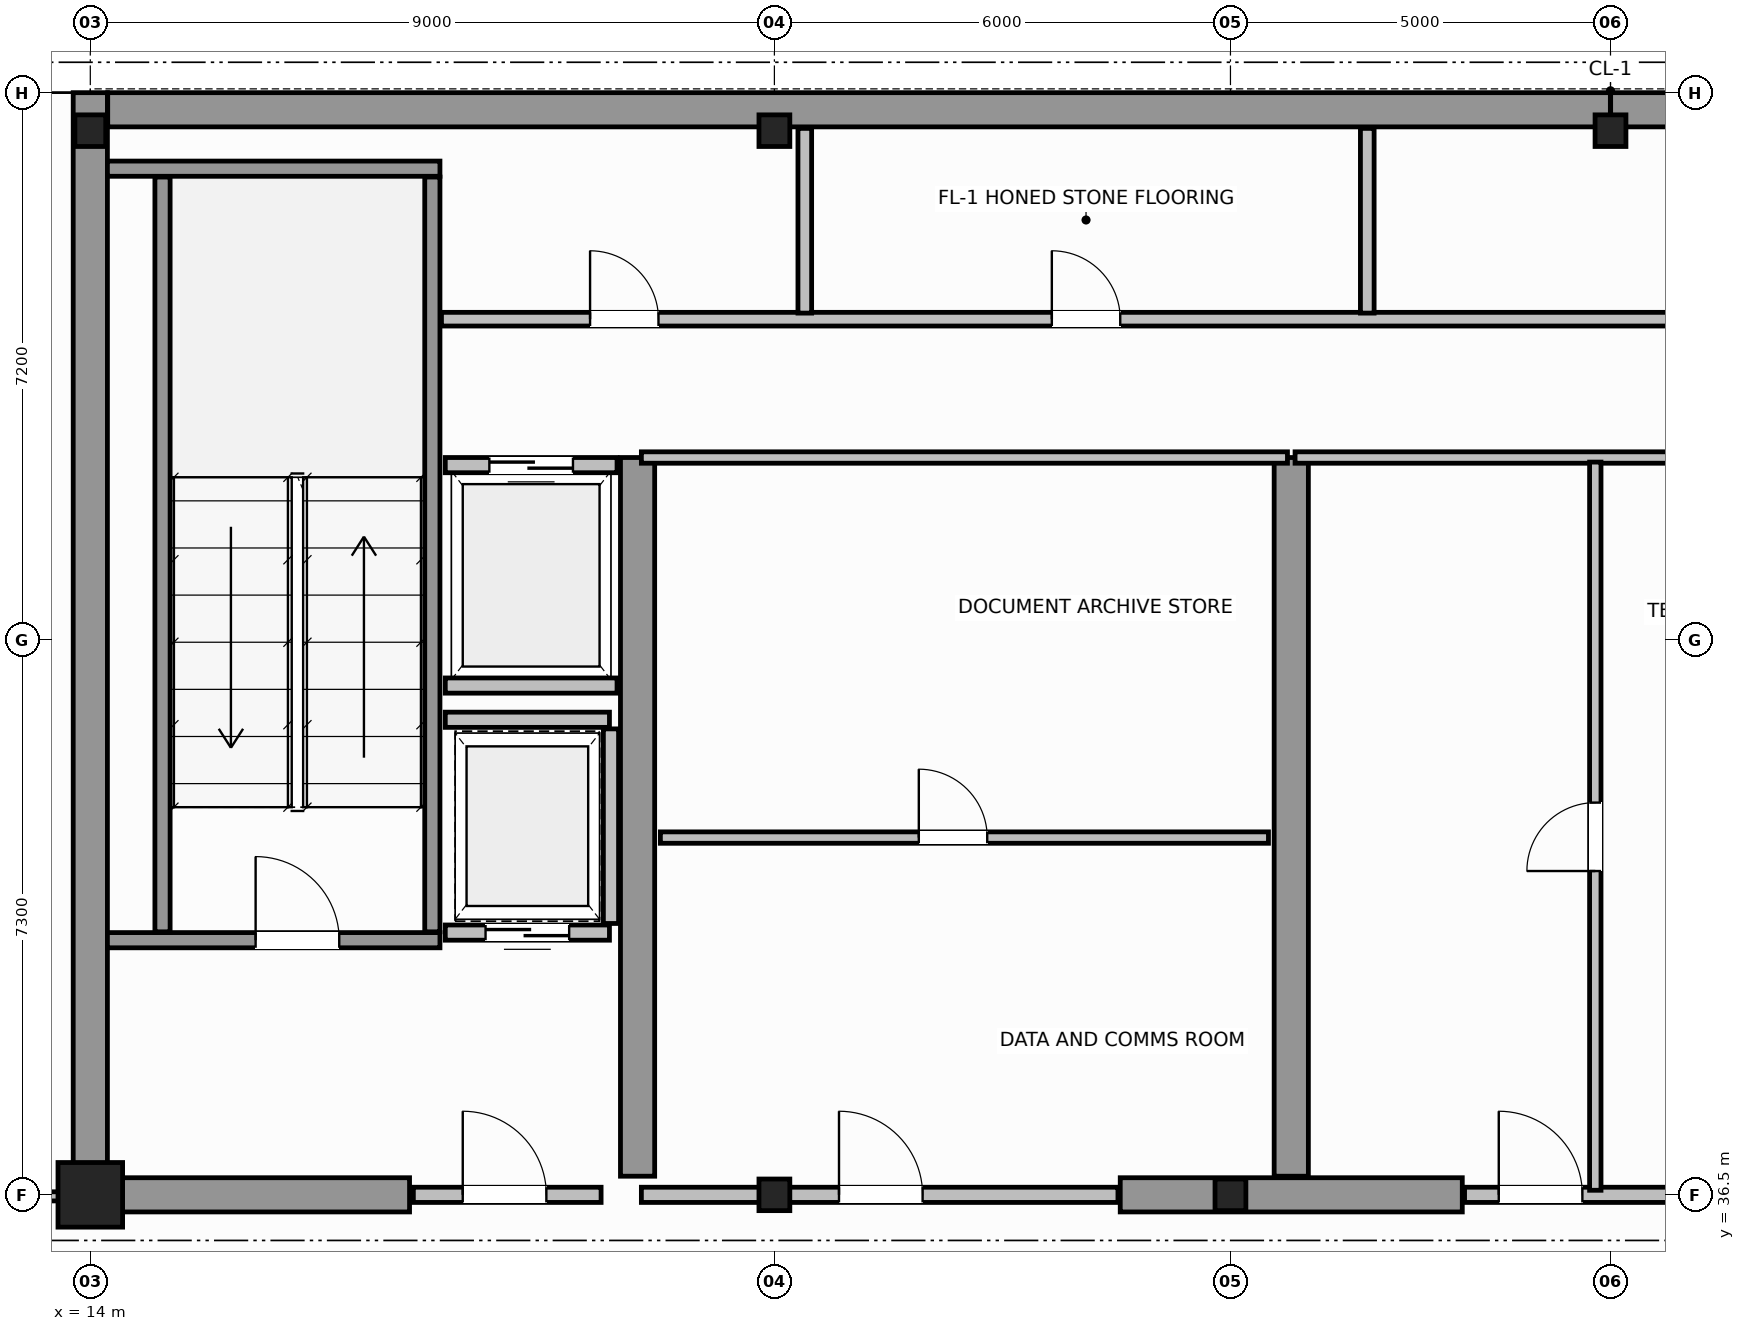
"""IFC4 building model, lengths in metres.
Left out: names, types, materials, properties, quantities, classifications, styles, units other than length and angle.
Written with IfcOpenShell. Run it as: python <this file> out.ifc"""

import sys

from ifc_helpers import new_model, si_unit, direction, frame, frame_2d, origin, origin_2d, place, context, subcontext, project, spatial, rectangle, i_section, extrude, source, transform, mapped, element, fill, save


model = new_model("IFC4")
c1 = context("Model", 3, precision=1e-05, world=origin(), true_north=direction((0.0, 1.0)))
c2 = subcontext(c1, "Body", "Model", "MODEL_VIEW")
j1 = project(units=[si_unit("LENGTHUNIT", "METRE"), si_unit("PLANEANGLEUNIT", "RADIAN")], contexts=[c1])
p1 = place(None, origin())
s1 = spatial("IfcSite", under=j1, at=p1, CompositionType="ELEMENT")
p2 = place(p1, origin())
s2 = spatial("IfcBuilding", under=s1, at=p2, CompositionType="ELEMENT")
p3 = place(p2, frame((0.0, 0.0, 299.2)))
s3 = spatial("IfcBuildingStorey", under=s2, at=p3, CompositionType="ELEMENT", Elevation=299.2)
m1 = source(origin(), c2, "Body", "SweptSolid", [
    extrude(rectangle(XDim=0.85, YDim=0.85, at=origin_2d()), origin(), (0.0, 0.0, 1.0), 4.6),
])
p4 = place(p3, frame((14.0, 36.5, 0.0), z_axis=(0.0, 0.0, 1.0), x_axis=(1.0, 0.0, 0.0)))
e1 = element("IfcColumn", 1, at=p4, inside=s3, PredefinedType="COLUMN", context=c2, shape_type="MappedRepresentation", body=[
    mapped(m1, transform((0.0, 0.0, 0.0), scale=1.0)),
])
m2 = source(origin(), c2, "Body", "SweptSolid", [
    extrude(i_section(OverallWidth=0.406, OverallDepth=0.416, WebThickness=0.03, FlangeThickness=0.042, FilletRadius=0.015, at=origin_2d()), origin(), (0.0, 0.0, 1.0), 4.6),
])
for number, where, z_axis, x_axis in (
    (2, (23.0, 36.5, 0.0), (0.0, 0.0, 1.0), (1.0, 0.0, 0.0)),
    (3, (29.0, 36.5, 0.0), (0.0, 0.0, 1.0), (1.0, 0.0, 0.0)),
    (4, (14.0, 50.5, 0.0), (0.0, 0.0, 1.0), (1.0, 0.0, 0.0)),
    (5, (23.0, 50.5, 0.0), (0.0, 0.0, 1.0), (1.0, 0.0, 0.0)),
    (6, (34.0, 50.5, 0.0), (0.0, 0.0, 1.0), (1.0, 0.0, 0.0)),
):
    element("IfcColumn", number, at=place(p3, frame(where, z_axis=z_axis, x_axis=x_axis)), inside=s3, PredefinedType="COLUMN", context=c2, shape_type="MappedRepresentation", body=[
        mapped(m2, transform((0.0, 0.0, 0.0), scale=1.0)),
    ])
for number, where, z_axis, x_axis in (
    (7, (14.229, 50.775, 0.0), (0.0, 0.0, 1.0), (1.0, 0.0, 0.0)),
    (8, (34.002, 50.775, 0.0), (0.0, 0.0, 1.0), (1.0, 0.0, 0.0)),
):
    element("IfcWall", number, at=place(p3, frame(where, z_axis=z_axis, x_axis=x_axis)), inside=s3, PredefinedType="SHEAR", context=c2, shape_type="SweptSolid", body=[
        extrude(rectangle(XDim=19.769, YDim=0.45, at=frame_2d((9.885, 0.0))), origin(), (0.0, 0.0, 1.0), 4.6),
    ])
p5 = place(p3, frame((14.0, 36.5, 0.0), z_axis=(0.0, 0.0, 1.0), x_axis=(0.0, 1.0, 0.0)))
e9 = element("IfcWall", 9, at=p5, inside=s3, PredefinedType="SHEAR", context=c2, shape_type="SweptSolid", body=[
    extrude(rectangle(XDim=14.5, YDim=0.45, at=frame_2d((7.25, 0.0))), origin(), (0.0, 0.0, 1.0), 4.6),
])
p6 = place(p3, frame((14.245, 36.5, 0.0), z_axis=(0.0, 0.0, 1.0), x_axis=(1.0, 0.0, 0.0)))
e10 = element("IfcWall", 10, at=p6, inside=s3, PredefinedType="SHEAR", context=c2, shape_type="SweptSolid", body=[
    extrude(rectangle(XDim=3.955, YDim=0.45, at=frame_2d((1.978, 0.0))), origin(), (0.0, 0.0, 1.0), 3.3),
])
p7 = place(p3, frame((27.55, 36.5, 0.0), z_axis=(0.0, 0.0, 1.0), x_axis=(1.0, 0.0, 0.0)))
e11 = element("IfcWall", 11, at=p7, inside=s3, PredefinedType="SHEAR", context=c2, shape_type="SweptSolid", body=[
    extrude(rectangle(XDim=4.5, YDim=0.45, at=frame_2d((2.25, 0.0))), origin(), (0.0, 0.0, 1.0), 4.6),
])
for number, where, z_axis, x_axis in (
    (12, (21.2, 36.745, 0.0), (0.0, 0.0, 1.0), (0.0, 1.0, 0.0)),
    (13, (29.8, 36.745, 0.0), (0.0, 0.0, 1.0), (0.0, 1.0, 0.0)),
):
    element("IfcWall", number, at=place(p3, frame(where, z_axis=z_axis, x_axis=x_axis)), inside=s3, PredefinedType="SHEAR", context=c2, shape_type="SweptSolid", body=[
        extrude(rectangle(XDim=9.455, YDim=0.45, at=frame_2d((4.728, 0.0))), origin(), (0.0, 0.0, 1.0), 4.6),
    ])
p8 = place(p3, frame((14.225, 39.85, 0.0), z_axis=(0.0, 0.0, 1.0), x_axis=(1.0, 0.0, 0.0)))
e14 = element("IfcWall", 14, at=p8, inside=s3, PredefinedType="SOLIDWALL", context=c2, shape_type="SweptSolid", body=[
    extrude(rectangle(XDim=4.375, YDim=0.2, at=frame_2d((2.188, 0.0))), origin(), (0.0, 0.0, 1.0), 4.6),
])
p9 = place(p8, frame((1.95, 0.0, 0.0)))
e15 = element("IfcOpeningElement", 15, at=p9, cuts=e14, PredefinedType="OPENING", context=c2, shape_type="SweptSolid", body=[
    extrude(rectangle(XDim=1.1, YDim=2.15, at=frame_2d((0.55, 1.075))), frame((0.0, 0.11, 0.0), z_axis=(0.0, -1.0, 0.0), x_axis=(1.0, 0.0, 0.0)), (0.0, 0.0, 1.0), 0.22),
])
p10 = place(p3, frame((14.225, 50.0, 0.0), z_axis=(0.0, 0.0, 1.0), x_axis=(1.0, 0.0, 0.0)))
e16 = element("IfcWall", 16, at=p10, inside=s3, PredefinedType="SOLIDWALL", context=c2, shape_type="SweptSolid", body=[
    extrude(rectangle(XDim=4.375, YDim=0.2, at=frame_2d((2.188, 0.0))), origin(), (0.0, 0.0, 1.0), 4.6),
])
for number, where, z_axis, x_axis in (
    (17, (14.95, 39.96, 0.0), (0.0, 0.0, 1.0), (0.0, 1.0, 0.0)),
    (18, (18.5, 39.96, 0.0), (0.0, 0.0, 1.0), (0.0, 1.0, 0.0)),
):
    element("IfcWall", number, at=place(p3, frame(where, z_axis=z_axis, x_axis=x_axis)), inside=s3, PredefinedType="SOLIDWALL", context=c2, shape_type="SweptSolid", body=[
        extrude(rectangle(XDim=9.93, YDim=0.2, at=frame_2d((4.965, 0.0))), origin(), (0.0, 0.0, 1.0), 4.6),
    ])
p11 = place(p3, frame((18.25, 36.5, 0.0), z_axis=(0.0, 0.0, 1.0), x_axis=(1.0, 0.0, 0.0)))
e19 = element("IfcWall", 19, at=p11, inside=s3, PredefinedType="SOLIDWALL", context=c2, shape_type="SweptSolid", body=[
    extrude(rectangle(XDim=2.47, YDim=0.2, at=frame_2d((1.235, 0.0))), origin(), (0.0, 0.0, 1.0), 3.29),
])
p12 = place(p11, frame((0.65, 0.0, 0.0)))
e20 = element("IfcOpeningElement", 20, at=p12, cuts=e19, PredefinedType="OPENING", context=c2, shape_type="SweptSolid", body=[
    extrude(rectangle(XDim=1.1, YDim=2.15, at=frame_2d((0.55, 1.075))), frame((0.0, 0.11, 0.0), z_axis=(0.0, -1.0, 0.0), x_axis=(1.0, 0.0, 0.0)), (0.0, 0.0, 1.0), 0.22),
])
p13 = place(p3, frame((18.67, 46.1, 0.0), z_axis=(0.0, 0.0, 1.0), x_axis=(1.0, 0.0, 0.0)))
e21 = element("IfcWall", 21, at=p13, inside=s3, PredefinedType="SOLIDWALL", context=c2, shape_type="SweptSolid", body=[
    extrude(rectangle(XDim=2.26, YDim=0.2, at=frame_2d((1.13, 0.0))), origin(), (0.0, 0.0, 1.0), 4.3),
])
p14 = place(p13, frame((0.58, 0.0, 0.0)))
e22 = element("IfcOpeningElement", 22, at=p14, cuts=e21, PredefinedType="OPENING", context=c2, shape_type="SweptSolid", body=[
    extrude(rectangle(XDim=1.1, YDim=2.15, at=frame_2d((0.55, 1.075))), frame((0.0, 0.11, 0.0), z_axis=(0.0, -1.0, 0.0), x_axis=(1.0, 0.0, 0.0)), (0.0, 0.0, 1.0), 0.22),
])
p15 = place(p3, frame((18.67, 43.2, 0.0), z_axis=(0.0, 0.0, 1.0), x_axis=(1.0, 0.0, 0.0)))
e23 = element("IfcWall", 23, at=p15, inside=s3, PredefinedType="SOLIDWALL", context=c2, shape_type="SweptSolid", body=[
    extrude(rectangle(XDim=2.26, YDim=0.2, at=frame_2d((1.13, 0.0))), origin(), (0.0, 0.0, 1.0), 4.3),
])
p16 = place(p3, frame((18.67, 39.95, 0.0), z_axis=(0.0, 0.0, 1.0), x_axis=(1.0, 0.0, 0.0)))
e24 = element("IfcWall", 24, at=p16, inside=s3, PredefinedType="SOLIDWALL", context=c2, shape_type="SweptSolid", body=[
    extrude(rectangle(XDim=2.16, YDim=0.2, at=frame_2d((1.08, 0.0))), origin(), (0.0, 0.0, 1.0), 4.3),
])
p17 = place(p16, frame((0.53, 0.0, 0.0)))
e25 = element("IfcOpeningElement", 25, at=p17, cuts=e24, PredefinedType="OPENING", context=c2, shape_type="SweptSolid", body=[
    extrude(rectangle(XDim=1.1, YDim=2.15, at=frame_2d((0.55, 1.075))), frame((0.0, 0.11, 0.0), z_axis=(0.0, -1.0, 0.0), x_axis=(1.0, 0.0, 0.0)), (0.0, 0.0, 1.0), 0.22),
])
p18 = place(p3, frame((18.67, 42.75, 0.0), z_axis=(0.0, 0.0, 1.0), x_axis=(1.0, 0.0, 0.0)))
e26 = element("IfcWall", 26, at=p18, inside=s3, PredefinedType="SOLIDWALL", context=c2, shape_type="SweptSolid", body=[
    extrude(rectangle(XDim=2.16, YDim=0.2, at=frame_2d((1.08, 0.0))), origin(), (0.0, 0.0, 1.0), 4.3),
])
p19 = place(p3, frame((20.85, 40.07, 0.0), z_axis=(0.0, 0.0, 1.0), x_axis=(0.0, 1.0, 0.0)))
e27 = element("IfcWall", 27, at=p19, inside=s3, PredefinedType="SOLIDWALL", context=c2, shape_type="SweptSolid", body=[
    extrude(rectangle(XDim=2.56, YDim=0.2, at=frame_2d((1.28, 0.0))), origin(), (0.0, 0.0, 1.0), 4.3),
])
p20 = place(p3, frame((21.25, 36.5, 0.0), z_axis=(0.0, 0.0, 1.0), x_axis=(1.0, 0.0, 0.0)))
e28 = element("IfcWall", 28, at=p20, inside=s3, PredefinedType="SOLIDWALL", context=c2, shape_type="SweptSolid", body=[
    extrude(rectangle(XDim=6.27, YDim=0.2, at=frame_2d((3.135, 0.0))), origin(), (0.0, 0.0, 1.0), 3.09),
])
p21 = place(p20, frame((2.6, 0.0, 0.0)))
e29 = element("IfcOpeningElement", 29, at=p21, cuts=e28, PredefinedType="OPENING", context=c2, shape_type="SweptSolid", body=[
    extrude(rectangle(XDim=1.1, YDim=2.15, at=frame_2d((0.55, 1.075))), frame((0.0, 0.11, 0.0), z_axis=(0.0, -1.0, 0.0), x_axis=(1.0, 0.0, 0.0)), (0.0, 0.0, 1.0), 0.22),
])
p22 = place(p3, frame((21.25, 46.2, 0.0), z_axis=(0.0, 0.0, 1.0), x_axis=(1.0, 0.0, 0.0)))
e30 = element("IfcWall", 30, at=p22, inside=s3, PredefinedType="PARTITIONING", context=c2, shape_type="SweptSolid", body=[
    extrude(rectangle(XDim=8.5, YDim=0.15, at=frame_2d((4.25, 0.0))), origin(), (0.0, 0.0, 1.0), 4.3),
])
p23 = place(p3, frame((21.5, 41.2, 0.0), z_axis=(0.0, 0.0, 1.0), x_axis=(1.0, 0.0, 0.0)))
e31 = element("IfcWall", 31, at=p23, inside=s3, PredefinedType="PARTITIONING", context=c2, shape_type="SweptSolid", body=[
    extrude(rectangle(XDim=8.0, YDim=0.15, at=frame_2d((4.0, 0.0))), origin(), (0.0, 0.0, 1.0), 4.3),
])
p24 = place(p23, frame((3.4, 0.0, 0.0)))
e32 = element("IfcOpeningElement", 32, at=p24, cuts=e31, PredefinedType="OPENING", context=c2, shape_type="SweptSolid", body=[
    extrude(rectangle(XDim=0.9, YDim=2.1, at=frame_2d((0.45, 1.05))), frame((0.0, 0.085, 0.0), z_axis=(0.0, -1.0, 0.0), x_axis=(1.0, 0.0, 0.0)), (0.0, 0.0, 1.0), 0.17),
])
p25 = place(p3, frame((32.08, 36.5, 0.0), z_axis=(0.0, 0.0, 1.0), x_axis=(1.0, 0.0, 0.0)))
e33 = element("IfcWall", 33, at=p25, inside=s3, PredefinedType="SOLIDWALL", context=c2, shape_type="SweptSolid", body=[
    extrude(rectangle(XDim=4.04, YDim=0.2, at=frame_2d((2.02, 0.0))), origin(), (0.0, 0.0, 1.0), 3.09),
])
p26 = place(p25, frame((0.45, 0.0, 0.0)))
e34 = element("IfcOpeningElement", 34, at=p26, cuts=e33, PredefinedType="OPENING", context=c2, shape_type="SweptSolid", body=[
    extrude(rectangle(XDim=1.1, YDim=2.15, at=frame_2d((0.55, 1.075))), frame((0.0, 0.11, 0.0), z_axis=(0.0, -1.0, 0.0), x_axis=(1.0, 0.0, 0.0)), (0.0, 0.0, 1.0), 0.22),
])
p27 = place(p3, frame((29.85, 46.2, 0.0), z_axis=(0.0, 0.0, 1.0), x_axis=(1.0, 0.0, 0.0)))
e35 = element("IfcWall", 35, at=p27, inside=s3, PredefinedType="PARTITIONING", context=c2, shape_type="SweptSolid", body=[
    extrude(rectangle(XDim=8.5, YDim=0.15, at=frame_2d((4.25, 0.0))), origin(), (0.0, 0.0, 1.0), 4.3),
])
p28 = place(p3, frame((33.8, 36.56, 0.0), z_axis=(0.0, 0.0, 1.0), x_axis=(0.0, 1.0, 0.0)))
e36 = element("IfcWall", 36, at=p28, inside=s3, PredefinedType="PARTITIONING", context=c2, shape_type="SweptSolid", body=[
    extrude(rectangle(XDim=9.58, YDim=0.15, at=frame_2d((4.79, 0.0))), origin(), (0.0, 0.0, 1.0), 4.3),
])
p29 = place(p28, frame((4.2, 0.0, 0.0)))
e37 = element("IfcOpeningElement", 37, at=p29, cuts=e36, PredefinedType="OPENING", context=c2, shape_type="SweptSolid", body=[
    extrude(rectangle(XDim=0.9, YDim=2.1, at=frame_2d((0.45, 1.05))), frame((0.0, 0.085, 0.0), z_axis=(0.0, -1.0, 0.0), x_axis=(1.0, 0.0, 0.0)), (0.0, 0.0, 1.0), 0.17),
])
p30 = place(p3, frame((18.62, 48.02, 0.0), z_axis=(0.0, 0.0, 1.0), x_axis=(1.0, 0.0, 0.0)))
e38 = element("IfcWall", 38, at=p30, inside=s3, PredefinedType="PLUMBINGWALL", context=c2, shape_type="SweptSolid", body=[
    extrude(rectangle(XDim=30.76, YDim=0.18, at=frame_2d((15.38, 0.0))), origin(), (0.0, 0.0, 1.0), 4.3),
])
p31 = place(p30, frame((1.955, 0.0, 0.0)))
e39 = element("IfcOpeningElement", 39, at=p31, cuts=e38, PredefinedType="OPENING", context=c2, shape_type="SweptSolid", body=[
    extrude(rectangle(XDim=0.9, YDim=2.15, at=frame_2d((0.45, 1.075))), frame((0.0, 0.1, 0.0), z_axis=(0.0, -1.0, 0.0), x_axis=(1.0, 0.0, 0.0)), (0.0, 0.0, 1.0), 0.2),
])
p32 = place(p30, frame((8.03, 0.0, 0.0)))
e40 = element("IfcOpeningElement", 40, at=p32, cuts=e38, PredefinedType="OPENING", context=c2, shape_type="SweptSolid", body=[
    extrude(rectangle(XDim=0.9, YDim=2.15, at=frame_2d((0.45, 1.075))), frame((0.0, 0.1, 0.0), z_axis=(0.0, -1.0, 0.0), x_axis=(1.0, 0.0, 0.0)), (0.0, 0.0, 1.0), 0.2),
])
p33 = place(p30, frame((16.93, 0.0, 0.0)))
e41 = element("IfcOpeningElement", 41, at=p33, cuts=e38, PredefinedType="OPENING", context=c2, shape_type="SweptSolid", body=[
    extrude(rectangle(XDim=0.9, YDim=2.15, at=frame_2d((0.45, 1.075))), frame((0.0, 0.1, 0.0), z_axis=(0.0, -1.0, 0.0), x_axis=(1.0, 0.0, 0.0)), (0.0, 0.0, 1.0), 0.2),
])
p34 = place(p30, frame((26.205, 0.0, 0.0)))
e42 = element("IfcOpeningElement", 42, at=p34, cuts=e38, PredefinedType="OPENING", context=c2, shape_type="SweptSolid", body=[
    extrude(rectangle(XDim=0.9, YDim=2.15, at=frame_2d((0.45, 1.075))), frame((0.0, 0.1, 0.0), z_axis=(0.0, -1.0, 0.0), x_axis=(1.0, 0.0, 0.0)), (0.0, 0.0, 1.0), 0.2),
])
p35 = place(p3, frame((23.4, 48.1, 0.0), z_axis=(0.0, 0.0, 1.0), x_axis=(0.0, 1.0, 0.0)))
e43 = element("IfcWall", 43, at=p35, inside=s3, PredefinedType="PLUMBINGWALL", context=c2, shape_type="SweptSolid", body=[
    extrude(rectangle(XDim=2.43, YDim=0.18, at=frame_2d((1.215, 0.0))), origin(), (0.0, 0.0, 1.0), 3.09),
])
p36 = place(p3, frame((30.8, 48.1, 0.0), z_axis=(0.0, 0.0, 1.0), x_axis=(0.0, 1.0, 0.0)))
e44 = element("IfcWall", 44, at=p36, inside=s3, PredefinedType="PLUMBINGWALL", context=c2, shape_type="SweptSolid", body=[
    extrude(rectangle(XDim=2.43, YDim=0.18, at=frame_2d((1.215, 0.0))), origin(), (0.0, 0.0, 1.0), 4.3),
])
p37 = place(p3, frame((7.336, 36.48, 0.0), z_axis=(0.0, 0.0, 1.0), x_axis=(1.0, 0.0, 0.0)))
e45 = element("IfcWall", 45, at=p37, inside=s3, PredefinedType="PARTITIONING", context=c2, shape_type="SweptSolid", body=[
    extrude(rectangle(XDim=6.604, YDim=0.12, at=frame_2d((3.302, 0.0))), origin(), (0.0, 0.0, 1.0), 3.09),
])
p38 = place(p37, frame((2.852, 0.0, 0.0)))
e46 = element("IfcOpeningElement", 46, at=p38, cuts=e45, PredefinedType="OPENING", context=c2, shape_type="SweptSolid", body=[
    extrude(rectangle(XDim=0.9, YDim=2.15, at=frame_2d((0.45, 1.075))), frame((0.0, 0.07, 0.0), z_axis=(0.0, -1.0, 0.0), x_axis=(1.0, 0.0, 0.0)), (0.0, 0.0, 1.0), 0.14),
])
m3 = source(origin(), c2, "Body", "SweptSolid", [
    extrude(rectangle(XDim=1.1, YDim=2.15, at=frame_2d((0.55, 1.075))), frame((0.0, 0.025, 0.0), z_axis=(0.0, -1.0, 0.0), x_axis=(1.0, 0.0, 0.0)), (0.0, 0.0, 1.0), 0.05),
])
p39 = place(p9, origin())
e47 = element("IfcDoor", 47, at=p39, inside=s3, OperationType="SINGLE_SWING_LEFT", PredefinedType="DOOR", context=c2, shape_type="MappedRepresentation", body=[
    mapped(m3, transform((0.0, 0.0, 0.0), scale=1.0)),
])
fill(e15, e47)
p40 = place(p12, origin())
e48 = element("IfcDoor", 48, at=p40, inside=s3, OperationType="SINGLE_SWING_RIGHT", PredefinedType="DOOR", context=c2, shape_type="MappedRepresentation", body=[
    mapped(m3, transform((0.0, 0.0, 0.0), scale=1.0)),
])
fill(e20, e48)
p41 = place(p14, origin())
e49 = element("IfcDoor", 49, at=p41, inside=s3, OperationType="DOUBLE_DOOR_SLIDING", PredefinedType="DOOR", context=c2, shape_type="MappedRepresentation", body=[
    mapped(m3, transform((0.0, 0.0, 0.0), scale=1.0)),
])
fill(e22, e49)
p42 = place(p17, origin())
e50 = element("IfcDoor", 50, at=p42, inside=s3, OperationType="DOUBLE_DOOR_SLIDING", PredefinedType="DOOR", context=c2, shape_type="MappedRepresentation", body=[
    mapped(m3, transform((0.0, 0.0, 0.0), scale=1.0)),
])
fill(e25, e50)
p43 = place(p21, origin())
e51 = element("IfcDoor", 51, at=p43, inside=s3, OperationType="SINGLE_SWING_LEFT", PredefinedType="DOOR", context=c2, shape_type="MappedRepresentation", body=[
    mapped(m3, transform((0.0, 0.0, 0.0), scale=1.0)),
])
fill(e29, e51)
m4 = source(origin(), c2, "Body", "SweptSolid", [
    extrude(rectangle(XDim=0.9, YDim=2.1, at=frame_2d((0.45, 1.05))), frame((0.0, 0.025, 0.0), z_axis=(0.0, -1.0, 0.0), x_axis=(1.0, 0.0, 0.0)), (0.0, 0.0, 1.0), 0.05),
])
p44 = place(p24, origin())
e52 = element("IfcDoor", 52, at=p44, inside=s3, OperationType="SINGLE_SWING_RIGHT", PredefinedType="DOOR", context=c2, shape_type="MappedRepresentation", body=[
    mapped(m4, transform((0.0, 0.0, 0.0), scale=1.0)),
])
fill(e32, e52)
p45 = place(p26, origin())
e53 = element("IfcDoor", 53, at=p45, inside=s3, OperationType="SINGLE_SWING_LEFT", PredefinedType="DOOR", context=c2, shape_type="MappedRepresentation", body=[
    mapped(m3, transform((0.0, 0.0, 0.0), scale=1.0)),
])
fill(e34, e53)
p46 = place(p29, origin())
e54 = element("IfcDoor", 54, at=p46, inside=s3, OperationType="SINGLE_SWING_RIGHT", PredefinedType="DOOR", context=c2, shape_type="MappedRepresentation", body=[
    mapped(m4, transform((0.0, 0.0, 0.0), scale=1.0)),
])
fill(e37, e54)
m5 = source(origin(), c2, "Body", "SweptSolid", [
    extrude(rectangle(XDim=0.9, YDim=2.15, at=frame_2d((0.45, 1.075))), frame((0.0, 0.025, 0.0), z_axis=(0.0, -1.0, 0.0), x_axis=(1.0, 0.0, 0.0)), (0.0, 0.0, 1.0), 0.05),
])
p47 = place(p31, origin())
e55 = element("IfcDoor", 55, at=p47, inside=s3, OperationType="SINGLE_SWING_LEFT", PredefinedType="DOOR", context=c2, shape_type="MappedRepresentation", body=[
    mapped(m5, transform((0.0, 0.0, 0.0), scale=1.0)),
])
fill(e39, e55)
p48 = place(p32, origin())
e56 = element("IfcDoor", 56, at=p48, inside=s3, OperationType="SINGLE_SWING_RIGHT", PredefinedType="DOOR", context=c2, shape_type="MappedRepresentation", body=[
    mapped(m5, transform((0.0, 0.0, 0.0), scale=1.0)),
])
fill(e40, e56)
save(model, sys.argv[1])
